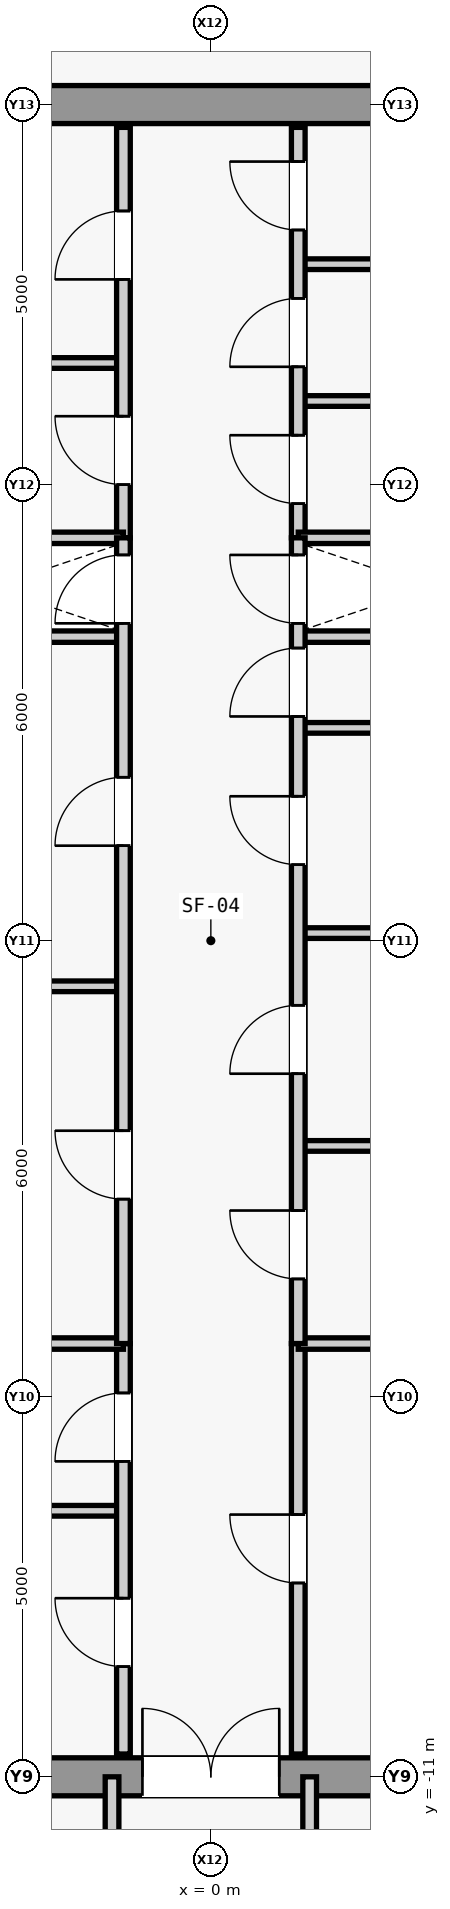
"""IFC4 building model, lengths in metres.
Left out: names, types, materials, properties, quantities, classifications, styles, units other than length and angle.
Written with IfcOpenShell. Run it as: python <this file> out.ifc"""

import sys

from ifc_helpers import new_model, si_unit, direction, frame, frame_2d, origin, place, context, subcontext, project, spatial, rectangle, extrude, source, transform, mapped, element, fill, save


model = new_model("IFC4")
c1 = context("Model", 3, precision=1e-05, world=origin(), true_north=direction((0.0, 1.0)))
c2 = subcontext(c1, "Body", "Model", "MODEL_VIEW")
j1 = project(units=[si_unit("LENGTHUNIT", "METRE"), si_unit("PLANEANGLEUNIT", "RADIAN")], contexts=[c1])
p1 = place(None, origin())
s1 = spatial("IfcSite", under=j1, at=p1, CompositionType="ELEMENT")
p2 = place(p1, origin())
s2 = spatial("IfcBuilding", under=s1, at=p2, CompositionType="ELEMENT")
p3 = place(p2, frame((0.0, 0.0, 370.3)))
s3 = spatial("IfcBuildingStorey", under=s2, at=p3, CompositionType="ELEMENT", Elevation=370.3)
m1 = source(origin(), c2, "Body", "SweptSolid", [
    extrude(rectangle(XDim=9.2, YDim=0.5, at=frame_2d((4.6, 0.0))), origin(), (0.0, 0.0, 1.0), 4.6),
])
p4 = place(p3, frame((-4.6, -11.0, 0.0), z_axis=(0.0, 0.0, 1.0), x_axis=(1.0, 0.0, 0.0)))
e1 = element("IfcWall", 1, at=p4, inside=s3, PredefinedType="SHEAR", context=c2, shape_type="MappedRepresentation", body=[
    mapped(m1, transform((0.0, 0.0, 0.0), scale=1.0)),
])
m2 = source(origin(), c2, "Body", "SweptSolid", [
    extrude(rectangle(XDim=1.8, YDim=2.25, at=frame_2d((0.9, 1.125))), frame((0.0, 0.26, 0.0), z_axis=(0.0, -1.0, 0.0), x_axis=(1.0, 0.0, 0.0)), (0.0, 0.0, 1.0), 0.52),
])
p5 = place(p4, frame((3.7, 0.0, 0.0)))
e2 = element("IfcOpeningElement", 2, at=p5, cuts=e1, PredefinedType="OPENING", context=c2, shape_type="MappedRepresentation", body=[
    mapped(m2, transform((0.0, 0.0, 0.0), scale=1.0)),
])
p6 = place(p3, frame((-4.6, 11.0, 0.0), z_axis=(0.0, 0.0, 1.0), x_axis=(1.0, 0.0, 0.0)))
e3 = element("IfcWall", 3, at=p6, inside=s3, PredefinedType="SHEAR", context=c2, shape_type="MappedRepresentation", body=[
    mapped(m1, transform((0.0, 0.0, 0.0), scale=1.0)),
])
m3 = source(origin(), c2, "Body", "SweptSolid", [
    extrude(rectangle(XDim=3.45, YDim=0.15, at=frame_2d((1.725, 0.0))), origin(), (0.0, 0.0, 1.0), 4.6),
])
for number, where, z_axis, x_axis in (
    (4, (-4.6, 4.0, 0.0), (0.0, 0.0, 1.0), (1.0, 0.0, 0.0)),
    (5, (1.15, 4.0, 0.0), (0.0, 0.0, 1.0), (1.0, 0.0, 0.0)),
):
    element("IfcWall", number, at=place(p3, frame(where, z_axis=z_axis, x_axis=x_axis)), inside=s3, PredefinedType="PARTITIONING", context=c2, shape_type="MappedRepresentation", body=[
        mapped(m3, transform((0.0, 0.0, 0.0), scale=1.0)),
    ])
m4 = source(origin(), c2, "Body", "SweptSolid", [
    extrude(rectangle(XDim=3.45, YDim=0.14, at=frame_2d((1.725, 0.0))), origin(), (0.0, 0.0, 1.0), 4.6),
])
p7 = place(p3, frame((-4.6, -7.5, 0.0), z_axis=(0.0, 0.0, 1.0), x_axis=(1.0, 0.0, 0.0)))
e6 = element("IfcWall", 6, at=p7, inside=s3, PredefinedType="PARTITIONING", context=c2, shape_type="MappedRepresentation", body=[
    mapped(m4, transform((0.0, 0.0, 0.0), scale=1.0)),
])
m5 = source(origin(), c2, "Body", "SweptSolid", [
    extrude(rectangle(XDim=5.4, YDim=0.18, at=frame_2d((2.7, 0.0))), origin(), (0.0, 0.0, 1.0), 4.6),
])
p8 = place(p3, frame((-1.15, -10.7, 0.0), z_axis=(0.0, 0.0, 1.0), x_axis=(0.0, 1.0, 0.0)))
e7 = element("IfcWall", 7, at=p8, inside=s3, PredefinedType="PARTITIONING", context=c2, shape_type="MappedRepresentation", body=[
    mapped(m5, transform((0.0, 0.0, 0.0), scale=1.0)),
])
m6 = source(origin(), c2, "Body", "SweptSolid", [
    extrude(rectangle(XDim=0.9, YDim=2.15, at=frame_2d((0.45, 1.075))), frame((0.0, 0.1, 0.0), z_axis=(0.0, -1.0, 0.0), x_axis=(1.0, 0.0, 0.0)), (0.0, 0.0, 1.0), 0.2),
])
p9 = place(p8, frame((1.15, 0.0, 0.0)))
e8 = element("IfcOpeningElement", 8, at=p9, cuts=e7, PredefinedType="OPENING", context=c2, shape_type="MappedRepresentation", body=[
    mapped(m6, transform((0.0, 0.0, 0.0), scale=1.0)),
])
p10 = place(p8, frame((3.85, 0.0, 0.0)))
e9 = element("IfcOpeningElement", 9, at=p10, cuts=e7, PredefinedType="OPENING", context=c2, shape_type="MappedRepresentation", body=[
    mapped(m6, transform((0.0, 0.0, 0.0), scale=1.0)),
])
p11 = place(p3, frame((1.15, -10.7, 0.0), z_axis=(0.0, 0.0, 1.0), x_axis=(0.0, 1.0, 0.0)))
e10 = element("IfcWall", 10, at=p11, inside=s3, PredefinedType="PARTITIONING", context=c2, shape_type="MappedRepresentation", body=[
    mapped(m5, transform((0.0, 0.0, 0.0), scale=1.0)),
])
p12 = place(p11, frame((2.25, 0.0, 0.0)))
e11 = element("IfcOpeningElement", 11, at=p12, cuts=e10, PredefinedType="OPENING", context=c2, shape_type="MappedRepresentation", body=[
    mapped(m6, transform((0.0, 0.0, 0.0), scale=1.0)),
])
for number, where, z_axis, x_axis in (
    (12, (-4.6, -5.3, 0.0), (0.0, 0.0, 1.0), (1.0, 0.0, 0.0)),
    (13, (1.15, -5.3, 0.0), (0.0, 0.0, 1.0), (1.0, 0.0, 0.0)),
):
    element("IfcWall", number, at=place(p3, frame(where, z_axis=z_axis, x_axis=x_axis)), inside=s3, PredefinedType="PARTITIONING", context=c2, shape_type="MappedRepresentation", body=[
        mapped(m3, transform((0.0, 0.0, 0.0), scale=1.0)),
    ])
p13 = place(p3, frame((-4.6, 7.6, 0.0), z_axis=(0.0, 0.0, 1.0), x_axis=(1.0, 0.0, 0.0)))
e14 = element("IfcWall", 14, at=p13, inside=s3, PredefinedType="PARTITIONING", context=c2, shape_type="MappedRepresentation", body=[
    mapped(m4, transform((0.0, 0.0, 0.0), scale=1.0)),
])
p14 = place(p3, frame((-1.15, 5.3, 0.0), z_axis=(0.0, 0.0, 1.0), x_axis=(0.0, 1.0, 0.0)))
e15 = element("IfcWall", 15, at=p14, inside=s3, PredefinedType="PARTITIONING", context=c2, shape_type="MappedRepresentation", body=[
    mapped(m5, transform((0.0, 0.0, 0.0), scale=1.0)),
])
p15 = place(p14, frame((0.7, 0.0, 0.0)))
e16 = element("IfcOpeningElement", 16, at=p15, cuts=e15, PredefinedType="OPENING", context=c2, shape_type="MappedRepresentation", body=[
    mapped(m6, transform((0.0, 0.0, 0.0), scale=1.0)),
])
p16 = place(p14, frame((3.4, 0.0, 0.0)))
e17 = element("IfcOpeningElement", 17, at=p16, cuts=e15, PredefinedType="OPENING", context=c2, shape_type="MappedRepresentation", body=[
    mapped(m6, transform((0.0, 0.0, 0.0), scale=1.0)),
])
for number, where, z_axis, x_axis in (
    (18, (1.15, 7.1, 0.0), (0.0, 0.0, 1.0), (1.0, 0.0, 0.0)),
    (19, (1.15, 8.9, 0.0), (0.0, 0.0, 1.0), (1.0, 0.0, 0.0)),
):
    element("IfcWall", number, at=place(p3, frame(where, z_axis=z_axis, x_axis=x_axis)), inside=s3, PredefinedType="PARTITIONING", context=c2, shape_type="MappedRepresentation", body=[
        mapped(m4, transform((0.0, 0.0, 0.0), scale=1.0)),
    ])
p17 = place(p3, frame((1.15, 5.3, 0.0), z_axis=(0.0, 0.0, 1.0), x_axis=(0.0, 1.0, 0.0)))
e20 = element("IfcWall", 20, at=p17, inside=s3, PredefinedType="PARTITIONING", context=c2, shape_type="MappedRepresentation", body=[
    mapped(m5, transform((0.0, 0.0, 0.0), scale=1.0)),
])
p18 = place(p17, frame((0.45, 0.0, 0.0)))
e21 = element("IfcOpeningElement", 21, at=p18, cuts=e20, PredefinedType="OPENING", context=c2, shape_type="MappedRepresentation", body=[
    mapped(m6, transform((0.0, 0.0, 0.0), scale=1.0)),
])
p19 = place(p17, frame((2.25, 0.0, 0.0)))
e22 = element("IfcOpeningElement", 22, at=p19, cuts=e20, PredefinedType="OPENING", context=c2, shape_type="MappedRepresentation", body=[
    mapped(m6, transform((0.0, 0.0, 0.0), scale=1.0)),
])
p20 = place(p17, frame((4.05, 0.0, 0.0)))
e23 = element("IfcOpeningElement", 23, at=p20, cuts=e20, PredefinedType="OPENING", context=c2, shape_type="MappedRepresentation", body=[
    mapped(m6, transform((0.0, 0.0, 0.0), scale=1.0)),
])
for number, where, z_axis, x_axis in (
    (24, (-4.6, 5.3, 0.0), (0.0, 0.0, 1.0), (1.0, 0.0, 0.0)),
    (25, (1.15, 5.3, 0.0), (0.0, 0.0, 1.0), (1.0, 0.0, 0.0)),
):
    element("IfcWall", number, at=place(p3, frame(where, z_axis=z_axis, x_axis=x_axis)), inside=s3, PredefinedType="PARTITIONING", context=c2, shape_type="MappedRepresentation", body=[
        mapped(m3, transform((0.0, 0.0, 0.0), scale=1.0)),
    ])
p21 = place(p3, frame((-4.6, -0.6, 0.0), z_axis=(0.0, 0.0, 1.0), x_axis=(1.0, 0.0, 0.0)))
e26 = element("IfcWall", 26, at=p21, inside=s3, PredefinedType="PARTITIONING", context=c2, shape_type="MappedRepresentation", body=[
    mapped(m4, transform((0.0, 0.0, 0.0), scale=1.0)),
])
m7 = source(origin(), c2, "Body", "SweptSolid", [
    extrude(rectangle(XDim=10.6, YDim=0.18, at=frame_2d((5.3, 0.0))), origin(), (0.0, 0.0, 1.0), 4.6),
])
p22 = place(p3, frame((-1.15, -5.3, 0.0), z_axis=(0.0, 0.0, 1.0), x_axis=(0.0, 1.0, 0.0)))
e27 = element("IfcWall", 27, at=p22, inside=s3, PredefinedType="PARTITIONING", context=c2, shape_type="MappedRepresentation", body=[
    mapped(m7, transform((0.0, 0.0, 0.0), scale=1.0)),
])
p23 = place(p22, frame((1.9, 0.0, 0.0)))
e28 = element("IfcOpeningElement", 28, at=p23, cuts=e27, PredefinedType="OPENING", context=c2, shape_type="MappedRepresentation", body=[
    mapped(m6, transform((0.0, 0.0, 0.0), scale=1.0)),
])
p24 = place(p22, frame((6.55, 0.0, 0.0)))
e29 = element("IfcOpeningElement", 29, at=p24, cuts=e27, PredefinedType="OPENING", context=c2, shape_type="MappedRepresentation", body=[
    mapped(m6, transform((0.0, 0.0, 0.0), scale=1.0)),
])
p25 = place(p22, frame((9.475, 0.0, 0.0)))
e30 = element("IfcOpeningElement", 30, at=p25, cuts=e27, PredefinedType="OPENING", context=c2, shape_type="MappedRepresentation", body=[
    mapped(m6, transform((0.0, 0.0, 0.0), scale=1.0)),
])
p26 = place(p3, frame((1.15, -2.7, 0.0), z_axis=(0.0, 0.0, 1.0), x_axis=(1.0, 0.0, 0.0)))
e31 = element("IfcWall", 31, at=p26, inside=s3, PredefinedType="PARTITIONING", context=c2, shape_type="MappedRepresentation", body=[
    mapped(m4, transform((0.0, 0.0, 0.0), scale=1.0)),
])
m8 = source(origin(), c2, "Body", "SweptSolid", [
    extrude(rectangle(XDim=3.45, YDim=0.14, at=frame_2d((1.725, 0.0))), origin(), (0.0, 0.0, 1.0), 3.905),
])
p27 = place(p3, frame((1.15, 0.1, 0.0), z_axis=(0.0, 0.0, 1.0), x_axis=(1.0, 0.0, 0.0)))
e32 = element("IfcWall", 32, at=p27, inside=s3, PredefinedType="PARTITIONING", context=c2, shape_type="MappedRepresentation", body=[
    mapped(m8, transform((0.0, 0.0, 0.0), scale=1.0)),
])
p28 = place(p3, frame((1.15, 2.8, 0.0), z_axis=(0.0, 0.0, 1.0), x_axis=(1.0, 0.0, 0.0)))
e33 = element("IfcWall", 33, at=p28, inside=s3, PredefinedType="PARTITIONING", context=c2, shape_type="MappedRepresentation", body=[
    mapped(m4, transform((0.0, 0.0, 0.0), scale=1.0)),
])
p29 = place(p3, frame((1.15, -5.3, 0.0), z_axis=(0.0, 0.0, 1.0), x_axis=(0.0, 1.0, 0.0)))
e34 = element("IfcWall", 34, at=p29, inside=s3, PredefinedType="PARTITIONING", context=c2, shape_type="MappedRepresentation", body=[
    mapped(m7, transform((0.0, 0.0, 0.0), scale=1.0)),
])
p30 = place(p29, frame((0.85, 0.0, 0.0)))
e35 = element("IfcOpeningElement", 35, at=p30, cuts=e34, PredefinedType="OPENING", context=c2, shape_type="MappedRepresentation", body=[
    mapped(m6, transform((0.0, 0.0, 0.0), scale=1.0)),
])
p31 = place(p29, frame((3.55, 0.0, 0.0)))
e36 = element("IfcOpeningElement", 36, at=p31, cuts=e34, PredefinedType="OPENING", context=c2, shape_type="MappedRepresentation", body=[
    mapped(m6, transform((0.0, 0.0, 0.0), scale=1.0)),
])
p32 = place(p29, frame((6.3, 0.0, 0.0)))
e37 = element("IfcOpeningElement", 37, at=p32, cuts=e34, PredefinedType="OPENING", context=c2, shape_type="MappedRepresentation", body=[
    mapped(m6, transform((0.0, 0.0, 0.0), scale=1.0)),
])
p33 = place(p29, frame((8.25, 0.0, 0.0)))
e38 = element("IfcOpeningElement", 38, at=p33, cuts=e34, PredefinedType="OPENING", context=c2, shape_type="MappedRepresentation", body=[
    mapped(m6, transform((0.0, 0.0, 0.0), scale=1.0)),
])
p34 = place(p29, frame((9.475, 0.0, 0.0)))
e39 = element("IfcOpeningElement", 39, at=p34, cuts=e34, PredefinedType="OPENING", context=c2, shape_type="MappedRepresentation", body=[
    mapped(m6, transform((0.0, 0.0, 0.0), scale=1.0)),
])
m9 = source(origin(), c2, "Body", "SweptSolid", [
    extrude(rectangle(XDim=6.0, YDim=0.18, at=frame_2d((3.0, 0.0))), origin(), (0.0, 0.0, 1.0), 4.6),
])
for number, where, z_axis, x_axis in (
    (40, (-1.3, -17.0, 0.0), (0.0, 0.0, 1.0), (0.0, 1.0, 0.0)),
    (41, (1.3, -17.0, 0.0), (0.0, 0.0, 1.0), (0.0, 1.0, 0.0)),
):
    element("IfcWall", number, at=place(p3, frame(where, z_axis=z_axis, x_axis=x_axis)), inside=s3, PredefinedType="PARTITIONING", context=c2, shape_type="MappedRepresentation", body=[
        mapped(m9, transform((0.0, 0.0, 0.0), scale=1.0)),
    ])
m10 = source(origin(), c2, "Body", "SweptSolid", [
    extrude(rectangle(XDim=0.9, YDim=2.15, at=frame_2d((0.45, 1.075))), frame((0.0, 0.025, 0.0), z_axis=(0.0, -1.0, 0.0), x_axis=(1.0, 0.0, 0.0)), (0.0, 0.0, 1.0), 0.05),
])
p35 = place(p9, origin())
e42 = element("IfcDoor", 42, at=p35, inside=s3, OperationType="SINGLE_SWING_RIGHT", PredefinedType="DOOR", context=c2, shape_type="MappedRepresentation", body=[
    mapped(m10, transform((0.0, 0.0, 0.0), scale=1.0)),
])
fill(e8, e42)
p36 = place(p10, origin())
e43 = element("IfcDoor", 43, at=p36, inside=s3, OperationType="SINGLE_SWING_LEFT", PredefinedType="DOOR", context=c2, shape_type="MappedRepresentation", body=[
    mapped(m10, transform((0.0, 0.0, 0.0), scale=1.0)),
])
fill(e9, e43)
p37 = place(p12, origin())
e44 = element("IfcDoor", 44, at=p37, inside=s3, OperationType="SINGLE_SWING_RIGHT", PredefinedType="DOOR", context=c2, shape_type="MappedRepresentation", body=[
    mapped(m10, transform((0.0, 0.0, 0.0), scale=1.0)),
])
fill(e11, e44)
m11 = source(origin(), c2, "Body", "SweptSolid", [
    extrude(rectangle(XDim=1.8, YDim=2.25, at=frame_2d((0.9, 1.125))), frame((0.0, 0.025, 0.0), z_axis=(0.0, -1.0, 0.0), x_axis=(1.0, 0.0, 0.0)), (0.0, 0.0, 1.0), 0.05),
])
p38 = place(p5, origin())
e45 = element("IfcDoor", 45, at=p38, inside=s3, OperationType="SINGLE_SWING_LEFT", PredefinedType="DOOR", context=c2, shape_type="MappedRepresentation", body=[
    mapped(m11, transform((0.0, 0.0, 0.0), scale=1.0)),
])
fill(e2, e45)
p39 = place(p15, origin())
e46 = element("IfcDoor", 46, at=p39, inside=s3, OperationType="SINGLE_SWING_RIGHT", PredefinedType="DOOR", context=c2, shape_type="MappedRepresentation", body=[
    mapped(m10, transform((0.0, 0.0, 0.0), scale=1.0)),
])
fill(e16, e46)
p40 = place(p16, origin())
e47 = element("IfcDoor", 47, at=p40, inside=s3, OperationType="SINGLE_SWING_LEFT", PredefinedType="DOOR", context=c2, shape_type="MappedRepresentation", body=[
    mapped(m10, transform((0.0, 0.0, 0.0), scale=1.0)),
])
fill(e17, e47)
p41 = place(p18, origin())
e48 = element("IfcDoor", 48, at=p41, inside=s3, OperationType="SINGLE_SWING_RIGHT", PredefinedType="DOOR", context=c2, shape_type="MappedRepresentation", body=[
    mapped(m10, transform((0.0, 0.0, 0.0), scale=1.0)),
])
fill(e21, e48)
p42 = place(p19, origin())
e49 = element("IfcDoor", 49, at=p42, inside=s3, OperationType="SINGLE_SWING_LEFT", PredefinedType="DOOR", context=c2, shape_type="MappedRepresentation", body=[
    mapped(m10, transform((0.0, 0.0, 0.0), scale=1.0)),
])
fill(e22, e49)
p43 = place(p20, origin())
e50 = element("IfcDoor", 50, at=p43, inside=s3, OperationType="SINGLE_SWING_RIGHT", PredefinedType="DOOR", context=c2, shape_type="MappedRepresentation", body=[
    mapped(m10, transform((0.0, 0.0, 0.0), scale=1.0)),
])
fill(e23, e50)
p44 = place(p23, origin())
e51 = element("IfcDoor", 51, at=p44, inside=s3, OperationType="SINGLE_SWING_RIGHT", PredefinedType="DOOR", context=c2, shape_type="MappedRepresentation", body=[
    mapped(m10, transform((0.0, 0.0, 0.0), scale=1.0)),
])
fill(e28, e51)
p45 = place(p24, origin())
e52 = element("IfcDoor", 52, at=p45, inside=s3, OperationType="SINGLE_SWING_LEFT", PredefinedType="DOOR", context=c2, shape_type="MappedRepresentation", body=[
    mapped(m10, transform((0.0, 0.0, 0.0), scale=1.0)),
])
fill(e29, e52)
p46 = place(p30, origin())
e53 = element("IfcDoor", 53, at=p46, inside=s3, OperationType="SINGLE_SWING_RIGHT", PredefinedType="DOOR", context=c2, shape_type="MappedRepresentation", body=[
    mapped(m10, transform((0.0, 0.0, 0.0), scale=1.0)),
])
fill(e35, e53)
p47 = place(p31, origin())
e54 = element("IfcDoor", 54, at=p47, inside=s3, OperationType="SINGLE_SWING_LEFT", PredefinedType="DOOR", context=c2, shape_type="MappedRepresentation", body=[
    mapped(m10, transform((0.0, 0.0, 0.0), scale=1.0)),
])
fill(e36, e54)
p48 = place(p32, origin())
e55 = element("IfcDoor", 55, at=p48, inside=s3, OperationType="SINGLE_SWING_RIGHT", PredefinedType="DOOR", context=c2, shape_type="MappedRepresentation", body=[
    mapped(m10, transform((0.0, 0.0, 0.0), scale=1.0)),
])
fill(e37, e55)
p49 = place(p33, origin())
e56 = element("IfcDoor", 56, at=p49, inside=s3, OperationType="SINGLE_SWING_LEFT", PredefinedType="DOOR", context=c2, shape_type="MappedRepresentation", body=[
    mapped(m10, transform((0.0, 0.0, 0.0), scale=1.0)),
])
fill(e38, e56)
p50 = place(p25, origin())
e57 = element("IfcDoor", 57, at=p50, inside=s3, OperationType="SINGLE_SWING_LEFT", PredefinedType="DOOR", context=c2, shape_type="MappedRepresentation", body=[
    mapped(m10, transform((0.0, 0.0, 0.0), scale=1.0)),
])
fill(e30, e57)
p51 = place(p34, origin())
e58 = element("IfcDoor", 58, at=p51, inside=s3, OperationType="SINGLE_SWING_RIGHT", PredefinedType="DOOR", context=c2, shape_type="MappedRepresentation", body=[
    mapped(m10, transform((0.0, 0.0, 0.0), scale=1.0)),
])
fill(e39, e58)
save(model, sys.argv[1])
